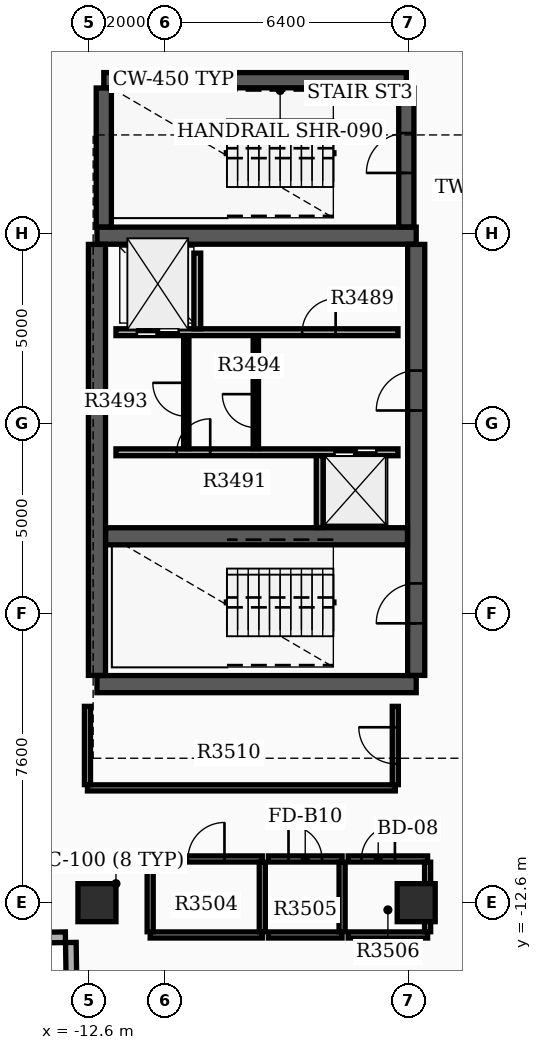
"""IFC4 building model, lengths in metres.
Left out: names, types, materials, properties, quantities, classifications, styles, units other than length and angle.
Written with IfcOpenShell. Run it as: python <this file> out.ifc"""

import sys

from ifc_helpers import new_model, si_unit, direction, frame, frame_2d, origin, origin_2d, place, context, subcontext, project, spatial, rectangle, extrude, element, fill, save


model = new_model("IFC4")
c1 = context("Model", 3, precision=1e-05, world=origin(), true_north=direction((0.0, 1.0)))
c2 = subcontext(c1, "Body", "Model", "MODEL_VIEW")
j1 = project(units=[si_unit("LENGTHUNIT", "METRE"), si_unit("PLANEANGLEUNIT", "RADIAN")], contexts=[c1])
p1 = place(None, origin())
s1 = spatial("IfcSite", under=j1, at=p1, CompositionType="ELEMENT")
p2 = place(p1, origin())
s2 = spatial("IfcBuilding", under=s1, at=p2, CompositionType="ELEMENT")
p3 = place(p2, frame((0.0, 0.0, 220.8)))
s3 = spatial("IfcBuildingStorey", under=s2, at=p3, CompositionType="ELEMENT", Elevation=220.8)
for number, where, z_axis, x_axis in (
    (1, (-12.4, -6.85, 0.0), (0.0, 0.0, 1.0), (1.0, 0.0, 0.0)),
    (2, (-12.4, 4.95, 0.0), (0.0, 0.0, 1.0), (1.0, 0.0, 0.0)),
):
    element("IfcWall", number, at=place(p3, frame(where, z_axis=z_axis, x_axis=x_axis)), inside=s3, PredefinedType="SHEAR", context=c2, shape_type="SweptSolid", body=[
        extrude(rectangle(XDim=8.4, YDim=0.45, at=frame_2d((4.2, 0.0))), origin(), (0.0, 0.0, 1.0), 3.7),
    ])
p4 = place(p3, frame((-12.4, -6.62, 0.0), z_axis=(0.0, 0.0, 1.0), x_axis=(0.0, 1.0, 0.0)))
e3 = element("IfcWall", 3, at=p4, inside=s3, PredefinedType="SHEAR", context=c2, shape_type="SweptSolid", body=[
    extrude(rectangle(XDim=11.34, YDim=0.45, at=frame_2d((5.67, 0.0))), origin(), (0.0, 0.0, 1.0), 3.7),
])
p5 = place(p3, frame((-4.0, -6.62, 0.0), z_axis=(0.0, 0.0, 1.0), x_axis=(0.0, 1.0, 0.0)))
e4 = element("IfcWall", 4, at=p5, inside=s3, PredefinedType="SHEAR", context=c2, shape_type="SweptSolid", body=[
    extrude(rectangle(XDim=11.34, YDim=0.45, at=frame_2d((5.67, 0.0))), origin(), (0.0, 0.0, 1.0), 3.7),
])
p6 = place(p5, frame((1.37, 0.0, 0.0)))
e5 = element("IfcOpeningElement", 5, at=p6, cuts=e4, PredefinedType="OPENING", context=c2, shape_type="SweptSolid", body=[
    extrude(rectangle(XDim=1.05, YDim=2.15, at=frame_2d((0.525, 1.075))), frame((0.0, 0.235, 0.0), z_axis=(0.0, -1.0, 0.0), x_axis=(1.0, 0.0, 0.0)), (0.0, 0.0, 1.0), 0.47),
])
p7 = place(p5, frame((6.97, 0.0, 0.0)))
e6 = element("IfcOpeningElement", 6, at=p7, cuts=e4, PredefinedType="OPENING", context=c2, shape_type="SweptSolid", body=[
    extrude(rectangle(XDim=1.05, YDim=2.15, at=frame_2d((0.525, 1.075))), frame((0.0, 0.235, 0.0), z_axis=(0.0, -1.0, 0.0), x_axis=(1.0, 0.0, 0.0)), (0.0, 0.0, 1.0), 0.47),
])
p8 = place(p3, frame((-12.17, -2.96, 0.0), z_axis=(0.0, 0.0, 1.0), x_axis=(1.0, 0.0, 0.0)))
e7 = element("IfcWall", 7, at=p8, inside=s3, PredefinedType="SHEAR", context=c2, shape_type="SweptSolid", body=[
    extrude(rectangle(XDim=7.94, YDim=0.45, at=frame_2d((3.97, 0.0))), origin(), (0.0, 0.0, 1.0), 3.7),
])
p9 = place(p3, frame((-12.22, 9.04, 0.0), z_axis=(0.0, 0.0, 1.0), x_axis=(1.0, 0.0, 0.0)))
e8 = element("IfcWall", 8, at=p9, inside=s3, PredefinedType="SHEAR", context=c2, shape_type="SweptSolid", body=[
    extrude(rectangle(XDim=7.96, YDim=0.4, at=frame_2d((3.98, 0.0))), origin(), (0.0, 0.0, 1.0), 3.7),
])
p10 = place(p3, frame((-12.22, 5.18, 0.0), z_axis=(0.0, 0.0, 1.0), x_axis=(0.0, 1.0, 0.0)))
e9 = element("IfcWall", 9, at=p10, inside=s3, PredefinedType="SHEAR", context=c2, shape_type="SweptSolid", body=[
    extrude(rectangle(XDim=3.655, YDim=0.4, at=frame_2d((1.828, 0.0))), origin(), (0.0, 0.0, 1.0), 3.7),
])
p11 = place(p3, frame((-4.26, 5.18, 0.0), z_axis=(0.0, 0.0, 1.0), x_axis=(0.0, 1.0, 0.0)))
e10 = element("IfcWall", 10, at=p11, inside=s3, PredefinedType="SHEAR", context=c2, shape_type="SweptSolid", body=[
    extrude(rectangle(XDim=3.655, YDim=0.4, at=frame_2d((1.828, 0.0))), origin(), (0.0, 0.0, 1.0), 3.7),
])
p12 = place(p11, frame((1.42, 0.0, 0.0)))
e11 = element("IfcOpeningElement", 11, at=p12, cuts=e10, PredefinedType="OPENING", context=c2, shape_type="SweptSolid", body=[
    extrude(rectangle(XDim=1.05, YDim=2.15, at=frame_2d((0.525, 1.075))), frame((0.0, 0.21, 0.0), z_axis=(0.0, -1.0, 0.0), x_axis=(1.0, 0.0, 0.0)), (0.0, 0.0, 1.0), 0.42),
])
for number, where, z_axis, x_axis in (
    (12, (-12.4, -12.6, 0.0), (0.0, 0.0, 1.0), (1.0, 0.0, 0.0)),
    (13, (-4.0, -12.6, 0.0), (0.0, 0.0, 1.0), (1.0, 0.0, 0.0)),
):
    element("IfcColumn", number, at=place(p3, frame(where, z_axis=z_axis, x_axis=x_axis)), inside=s3, PredefinedType="COLUMN", context=c2, shape_type="SweptSolid", body=[
        extrude(rectangle(XDim=1.0, YDim=1.0, at=origin_2d()), origin(), (0.0, 0.0, 1.0), 3.9),
    ])
p13 = place(p3, frame((-14.449, -13.529, 0.0), z_axis=(0.0, 0.0, 1.0), x_axis=(0.999878147354, 0.015610587569, 0.0)))
e14 = element("IfcWall", 14, at=p13, inside=s3, PredefinedType="STANDARD", context=c2, shape_type="SweptSolid", body=[
    extrude(rectangle(XDim=1.22, YDim=0.28, at=frame_2d((0.61, 0.0))), origin(), (0.0, 0.0, 1.0), 3.18),
])
p14 = place(p3, frame((-13.087, -13.647, 0.0), z_axis=(0.0, 0.0, 1.0), x_axis=(0.015785793208, -0.999875396603, 0.0)))
e15 = element("IfcWall", 15, at=p14, inside=s3, PredefinedType="STANDARD", context=c2, shape_type="SweptSolid", body=[
    extrude(rectangle(XDim=1.5, YDim=0.28, at=frame_2d((0.75, 0.0))), origin(), (0.0, 0.0, 1.0), 3.18),
])
p15 = place(p3, frame((-11.9, 2.41, 0.0), z_axis=(0.0, 0.0, 1.0), x_axis=(1.0, 0.0, 0.0)))
e16 = element("IfcWall", 16, at=p15, inside=s3, PredefinedType="SOLIDWALL", context=c2, shape_type="SweptSolid", body=[
    extrude(rectangle(XDim=7.42, YDim=0.18, at=frame_2d((3.71, 0.0))), origin(), (0.0, 0.0, 1.0), 3.17),
])
p16 = place(p15, frame((0.55, 0.0, 0.0)))
e17 = element("IfcOpeningElement", 17, at=p16, cuts=e16, PredefinedType="OPENING", context=c2, shape_type="SweptSolid", body=[
    extrude(rectangle(XDim=1.1, YDim=2.15, at=frame_2d((0.55, 1.075))), frame((0.0, 0.1, 0.0), z_axis=(0.0, -1.0, 0.0), x_axis=(1.0, 0.0, 0.0)), (0.0, 0.0, 1.0), 0.2),
])
p17 = place(p15, frame((4.9, 0.0, 0.0)))
e18 = element("IfcOpeningElement", 18, at=p17, cuts=e16, PredefinedType="OPENING", context=c2, shape_type="SweptSolid", body=[
    extrude(rectangle(XDim=0.88, YDim=2.1, at=frame_2d((0.44, 1.05))), frame((0.0, 0.1, 0.0), z_axis=(0.0, -1.0, 0.0), x_axis=(1.0, 0.0, 0.0)), (0.0, 0.0, 1.0), 0.2),
])
p18 = place(p3, frame((-11.9, -0.75, 0.0), z_axis=(0.0, 0.0, 1.0), x_axis=(1.0, 0.0, 0.0)))
e19 = element("IfcWall", 19, at=p18, inside=s3, PredefinedType="SOLIDWALL", context=c2, shape_type="SweptSolid", body=[
    extrude(rectangle(XDim=7.42, YDim=0.18, at=frame_2d((3.71, 0.0))), origin(), (0.0, 0.0, 1.0), 3.17),
])
p19 = place(p18, frame((5.75, 0.0, 0.0)))
e20 = element("IfcOpeningElement", 20, at=p19, cuts=e19, PredefinedType="OPENING", context=c2, shape_type="SweptSolid", body=[
    extrude(rectangle(XDim=1.1, YDim=2.15, at=frame_2d((0.55, 1.075))), frame((0.0, 0.1, 0.0), z_axis=(0.0, -1.0, 0.0), x_axis=(1.0, 0.0, 0.0)), (0.0, 0.0, 1.0), 0.2),
])
p20 = place(p18, frame((1.6, 0.0, 0.0)))
e21 = element("IfcOpeningElement", 21, at=p20, cuts=e19, PredefinedType="OPENING", context=c2, shape_type="SweptSolid", body=[
    extrude(rectangle(XDim=0.88, YDim=2.1, at=frame_2d((0.44, 1.05))), frame((0.0, 0.1, 0.0), z_axis=(0.0, -1.0, 0.0), x_axis=(1.0, 0.0, 0.0)), (0.0, 0.0, 1.0), 0.2),
])
p21 = place(p3, frame((-9.76, 2.5, 0.0), z_axis=(0.0, 0.0, 1.0), x_axis=(0.0, 1.0, 0.0)))
e22 = element("IfcWall", 22, at=p21, inside=s3, PredefinedType="SOLIDWALL", context=c2, shape_type="SweptSolid", body=[
    extrude(rectangle(XDim=1.99, YDim=0.18, at=frame_2d((0.995, 0.0))), origin(), (0.0, 0.0, 1.0), 3.17),
])
p22 = place(p3, frame((-6.54, -2.73, 0.0), z_axis=(0.0, 0.0, 1.0), x_axis=(0.0, 1.0, 0.0)))
e23 = element("IfcWall", 23, at=p22, inside=s3, PredefinedType="SOLIDWALL", context=c2, shape_type="SweptSolid", body=[
    extrude(rectangle(XDim=1.89, YDim=0.18, at=frame_2d((0.945, 0.0))), origin(), (0.0, 0.0, 1.0), 3.17),
])
p23 = place(p3, frame((-8.22, -0.65, 0.0), z_axis=(0.0, 0.0, 1.0), x_axis=(0.0, 1.0, 0.0)))
e24 = element("IfcWall", 24, at=p23, inside=s3, PredefinedType="SOLIDWALL", context=c2, shape_type="SweptSolid", body=[
    extrude(rectangle(XDim=2.96, YDim=0.14, at=frame_2d((1.48, 0.0))), origin(), (0.0, 0.0, 1.0), 3.17),
])
p24 = place(p23, frame((0.55, 0.0, 0.0)))
e25 = element("IfcOpeningElement", 25, at=p24, cuts=e24, PredefinedType="OPENING", context=c2, shape_type="SweptSolid", body=[
    extrude(rectangle(XDim=0.88, YDim=2.1, at=frame_2d((0.44, 1.05))), frame((0.0, 0.08, 0.0), z_axis=(0.0, -1.0, 0.0), x_axis=(1.0, 0.0, 0.0)), (0.0, 0.0, 1.0), 0.16),
])
p25 = place(p3, frame((-10.05, -0.652, 0.0), z_axis=(0.0, 0.0, 1.0), x_axis=(0.0, 1.0, 0.0)))
e26 = element("IfcWall", 26, at=p25, inside=s3, PredefinedType="PARTITIONING", context=c2, shape_type="SweptSolid", body=[
    extrude(rectangle(XDim=2.962, YDim=0.14, at=frame_2d((1.481, 0.0))), origin(), (0.0, 0.0, 1.0), 3.17),
])
p26 = place(p25, frame((0.85, 0.0, 0.0)))
e27 = element("IfcOpeningElement", 27, at=p26, cuts=e26, PredefinedType="OPENING", context=c2, shape_type="SweptSolid", body=[
    extrude(rectangle(XDim=0.88, YDim=2.1, at=frame_2d((0.44, 1.05))), frame((0.0, 0.08, 0.0), z_axis=(0.0, -1.0, 0.0), x_axis=(1.0, 0.0, 0.0)), (0.0, 0.0, 1.0), 0.16),
])
p27 = place(p3, frame((-11.0, -13.45, 0.0), z_axis=(0.0, 0.0, 1.0), x_axis=(1.0, 0.0, 0.0)))
e28 = element("IfcWall", 28, at=p27, inside=s3, PredefinedType="PARTITIONING", context=c2, shape_type="SweptSolid", body=[
    extrude(rectangle(XDim=2.95, YDim=0.16, at=frame_2d((1.475, 0.0))), origin(), (0.0, 0.0, 1.0), 3.17),
])
p28 = place(p3, frame((-11.0, -11.45, 0.0), z_axis=(0.0, 0.0, 1.0), x_axis=(1.0, 0.0, 0.0)))
e29 = element("IfcWall", 29, at=p28, inside=s3, PredefinedType="PARTITIONING", context=c2, shape_type="SweptSolid", body=[
    extrude(rectangle(XDim=2.95, YDim=0.16, at=frame_2d((1.475, 0.0))), origin(), (0.0, 0.0, 1.0), 3.17),
])
p29 = place(p28, frame((0.995, 0.0, 0.0)))
e30 = element("IfcOpeningElement", 30, at=p29, cuts=e29, PredefinedType="OPENING", context=c2, shape_type="SweptSolid", body=[
    extrude(rectangle(XDim=0.96, YDim=2.15, at=frame_2d((0.48, 1.075))), frame((0.0, 0.09, 0.0), z_axis=(0.0, -1.0, 0.0), x_axis=(1.0, 0.0, 0.0)), (0.0, 0.0, 1.0), 0.18),
])
for number, where, z_axis, x_axis in (
    (31, (-11.0, -13.365, 0.0), (0.0, 0.0, 1.0), (0.0, 1.0, 0.0)),
    (32, (-8.05, -13.365, 0.0), (0.0, 0.0, 1.0), (0.0, 1.0, 0.0)),
):
    element("IfcWall", number, at=place(p3, frame(where, z_axis=z_axis, x_axis=x_axis)), inside=s3, PredefinedType="PARTITIONING", context=c2, shape_type="SweptSolid", body=[
        extrude(rectangle(XDim=1.83, YDim=0.16, at=frame_2d((0.915, 0.0))), origin(), (0.0, 0.0, 1.0), 3.17),
    ])
p30 = place(p3, frame((-7.89, -13.45, 0.0), z_axis=(0.0, 0.0, 1.0), x_axis=(1.0, 0.0, 0.0)))
e33 = element("IfcWall", 33, at=p30, inside=s3, PredefinedType="PARTITIONING", context=c2, shape_type="SweptSolid", body=[
    extrude(rectangle(XDim=1.94, YDim=0.16, at=frame_2d((0.97, 0.0))), origin(), (0.0, 0.0, 1.0), 3.17),
])
p31 = place(p3, frame((-7.89, -11.45, 0.0), z_axis=(0.0, 0.0, 1.0), x_axis=(1.0, 0.0, 0.0)))
e34 = element("IfcWall", 34, at=p31, inside=s3, PredefinedType="PARTITIONING", context=c2, shape_type="SweptSolid", body=[
    extrude(rectangle(XDim=1.94, YDim=0.16, at=frame_2d((0.97, 0.0))), origin(), (0.0, 0.0, 1.0), 3.17),
])
p32 = place(p31, frame((0.53, 0.0, 0.0)))
e35 = element("IfcOpeningElement", 35, at=p32, cuts=e34, PredefinedType="OPENING", context=c2, shape_type="SweptSolid", body=[
    extrude(rectangle(XDim=0.88, YDim=2.1, at=frame_2d((0.44, 1.05))), frame((0.0, 0.09, 0.0), z_axis=(0.0, -1.0, 0.0), x_axis=(1.0, 0.0, 0.0)), (0.0, 0.0, 1.0), 0.18),
])
p33 = place(p3, frame((-5.95, -13.365, 0.0), z_axis=(0.0, 0.0, 1.0), x_axis=(0.0, 1.0, 0.0)))
e36 = element("IfcWall", 36, at=p33, inside=s3, PredefinedType="PARTITIONING", context=c2, shape_type="SweptSolid", body=[
    extrude(rectangle(XDim=1.83, YDim=0.16, at=frame_2d((0.915, 0.0))), origin(), (0.0, 0.0, 1.0), 3.17),
])
p34 = place(p3, frame((-5.79, -13.45, 0.0), z_axis=(0.0, 0.0, 1.0), x_axis=(1.0, 0.0, 0.0)))
e37 = element("IfcWall", 37, at=p34, inside=s3, PredefinedType="PARTITIONING", context=c2, shape_type="SweptSolid", body=[
    extrude(rectangle(XDim=2.09, YDim=0.16, at=frame_2d((1.045, 0.0))), origin(), (0.0, 0.0, 1.0), 3.17),
])
p35 = place(p3, frame((-5.79, -11.45, 0.0), z_axis=(0.0, 0.0, 1.0), x_axis=(1.0, 0.0, 0.0)))
e38 = element("IfcWall", 38, at=p35, inside=s3, PredefinedType="PARTITIONING", context=c2, shape_type="SweptSolid", body=[
    extrude(rectangle(XDim=2.09, YDim=0.16, at=frame_2d((1.045, 0.0))), origin(), (0.0, 0.0, 1.0), 3.17),
])
p36 = place(p35, frame((0.35, 0.0, 0.0)))
e39 = element("IfcOpeningElement", 39, at=p36, cuts=e38, PredefinedType="OPENING", context=c2, shape_type="SweptSolid", body=[
    extrude(rectangle(XDim=0.88, YDim=2.15, at=frame_2d((0.44, 1.075))), frame((0.0, 0.09, 0.0), z_axis=(0.0, -1.0, 0.0), x_axis=(1.0, 0.0, 0.0)), (0.0, 0.0, 1.0), 0.18),
])
p37 = place(p3, frame((-3.7, -13.365, 0.0), z_axis=(0.0, 0.0, 1.0), x_axis=(0.0, 1.0, 0.0)))
e40 = element("IfcWall", 40, at=p37, inside=s3, PredefinedType="PARTITIONING", context=c2, shape_type="SweptSolid", body=[
    extrude(rectangle(XDim=1.83, YDim=0.16, at=frame_2d((0.915, 0.0))), origin(), (0.0, 0.0, 1.0), 3.17),
])
p38 = place(p3, frame((-12.65, -9.58, 0.0), z_axis=(0.0, 0.0, 1.0), x_axis=(1.0, 0.0, 0.0)))
e41 = element("IfcWall", 41, at=p38, inside=s3, PredefinedType="PARTITIONING", context=c2, shape_type="SweptSolid", body=[
    extrude(rectangle(XDim=8.1, YDim=0.16, at=frame_2d((4.05, 0.0))), origin(), (0.0, 0.0, 1.0), 3.17),
])
p39 = place(p3, frame((-12.65, -9.495, 0.0), z_axis=(0.0, 0.0, 1.0), x_axis=(0.0, 1.0, 0.0)))
e42 = element("IfcWall", 42, at=p39, inside=s3, PredefinedType="PARTITIONING", context=c2, shape_type="SweptSolid", body=[
    extrude(rectangle(XDim=2.06, YDim=0.16, at=frame_2d((1.03, 0.0))), origin(), (0.0, 0.0, 1.0), 3.17),
])
p40 = place(p3, frame((-4.55, -9.495, 0.0), z_axis=(0.0, 0.0, 1.0), x_axis=(0.0, 1.0, 0.0)))
e43 = element("IfcWall", 43, at=p40, inside=s3, PredefinedType="PARTITIONING", context=c2, shape_type="SweptSolid", body=[
    extrude(rectangle(XDim=2.06, YDim=0.16, at=frame_2d((1.03, 0.0))), origin(), (0.0, 0.0, 1.0), 3.17),
])
p41 = place(p40, frame((0.55, 0.0, 0.0)))
e44 = element("IfcOpeningElement", 44, at=p41, cuts=e43, PredefinedType="OPENING", context=c2, shape_type="SweptSolid", body=[
    extrude(rectangle(XDim=0.96, YDim=2.15, at=frame_2d((0.48, 1.075))), frame((0.0, 0.09, 0.0), z_axis=(0.0, -1.0, 0.0), x_axis=(1.0, 0.0, 0.0)), (0.0, 0.0, 1.0), 0.18),
])
p42 = place(p6, origin())
e45 = element("IfcDoor", 45, at=p42, inside=s3, OperationType="SINGLE_SWING_LEFT", PredefinedType="DOOR", context=c2, shape_type="SweptSolid", body=[
    extrude(rectangle(XDim=1.05, YDim=2.15, at=frame_2d((0.525, 1.075))), frame((0.0, 0.025, 0.0), z_axis=(0.0, -1.0, 0.0), x_axis=(1.0, 0.0, 0.0)), (0.0, 0.0, 1.0), 0.05),
])
fill(e5, e45)
p43 = place(p7, origin())
e46 = element("IfcDoor", 46, at=p43, inside=s3, OperationType="SINGLE_SWING_LEFT", PredefinedType="DOOR", context=c2, shape_type="SweptSolid", body=[
    extrude(rectangle(XDim=1.05, YDim=2.15, at=frame_2d((0.525, 1.075))), frame((0.0, 0.025, 0.0), z_axis=(0.0, -1.0, 0.0), x_axis=(1.0, 0.0, 0.0)), (0.0, 0.0, 1.0), 0.05),
])
fill(e6, e46)
p44 = place(p12, origin())
e47 = element("IfcDoor", 47, at=p44, inside=s3, OperationType="SINGLE_SWING_LEFT", PredefinedType="DOOR", context=c2, shape_type="SweptSolid", body=[
    extrude(rectangle(XDim=1.05, YDim=2.15, at=frame_2d((0.525, 1.075))), frame((0.0, 0.025, 0.0), z_axis=(0.0, -1.0, 0.0), x_axis=(1.0, 0.0, 0.0)), (0.0, 0.0, 1.0), 0.05),
])
fill(e11, e47)
p45 = place(p16, origin())
e48 = element("IfcDoor", 48, at=p45, inside=s3, OperationType="DOUBLE_DOOR_SLIDING", PredefinedType="DOOR", context=c2, shape_type="SweptSolid", body=[
    extrude(rectangle(XDim=1.1, YDim=2.15, at=frame_2d((0.55, 1.075))), frame((0.0, 0.025, 0.0), z_axis=(0.0, -1.0, 0.0), x_axis=(1.0, 0.0, 0.0)), (0.0, 0.0, 1.0), 0.05),
])
fill(e17, e48)
p46 = place(p19, origin())
e49 = element("IfcDoor", 49, at=p46, inside=s3, OperationType="DOUBLE_DOOR_SLIDING", PredefinedType="DOOR", context=c2, shape_type="SweptSolid", body=[
    extrude(rectangle(XDim=1.1, YDim=2.15, at=frame_2d((0.55, 1.075))), frame((0.0, 0.025, 0.0), z_axis=(0.0, -1.0, 0.0), x_axis=(1.0, 0.0, 0.0)), (0.0, 0.0, 1.0), 0.05),
])
fill(e20, e49)
p47 = place(p17, origin())
e50 = element("IfcDoor", 50, at=p47, inside=s3, OperationType="SINGLE_SWING_RIGHT", PredefinedType="DOOR", context=c2, shape_type="SweptSolid", body=[
    extrude(rectangle(XDim=0.88, YDim=2.1, at=frame_2d((0.44, 1.05))), frame((0.0, 0.025, 0.0), z_axis=(0.0, -1.0, 0.0), x_axis=(1.0, 0.0, 0.0)), (0.0, 0.0, 1.0), 0.05),
])
fill(e18, e50)
p48 = place(p20, origin())
e51 = element("IfcDoor", 51, at=p48, inside=s3, OperationType="SINGLE_SWING_RIGHT", PredefinedType="DOOR", context=c2, shape_type="SweptSolid", body=[
    extrude(rectangle(XDim=0.88, YDim=2.1, at=frame_2d((0.44, 1.05))), frame((0.0, 0.025, 0.0), z_axis=(0.0, -1.0, 0.0), x_axis=(1.0, 0.0, 0.0)), (0.0, 0.0, 1.0), 0.05),
])
fill(e21, e51)
p49 = place(p24, origin())
e52 = element("IfcDoor", 52, at=p49, inside=s3, OperationType="SINGLE_SWING_RIGHT", PredefinedType="DOOR", context=c2, shape_type="SweptSolid", body=[
    extrude(rectangle(XDim=0.88, YDim=2.1, at=frame_2d((0.44, 1.05))), frame((0.0, 0.025, 0.0), z_axis=(0.0, -1.0, 0.0), x_axis=(1.0, 0.0, 0.0)), (0.0, 0.0, 1.0), 0.05),
])
fill(e25, e52)
p50 = place(p26, origin())
e53 = element("IfcDoor", 53, at=p50, inside=s3, OperationType="SINGLE_SWING_RIGHT", PredefinedType="DOOR", context=c2, shape_type="SweptSolid", body=[
    extrude(rectangle(XDim=0.88, YDim=2.1, at=frame_2d((0.44, 1.05))), frame((0.0, 0.025, 0.0), z_axis=(0.0, -1.0, 0.0), x_axis=(1.0, 0.0, 0.0)), (0.0, 0.0, 1.0), 0.05),
])
fill(e27, e53)
p51 = place(p29, origin())
e54 = element("IfcDoor", 54, at=p51, inside=s3, OperationType="SINGLE_SWING_RIGHT", PredefinedType="DOOR", context=c2, shape_type="SweptSolid", body=[
    extrude(rectangle(XDim=0.96, YDim=2.15, at=frame_2d((0.48, 1.075))), frame((0.0, 0.025, 0.0), z_axis=(0.0, -1.0, 0.0), x_axis=(1.0, 0.0, 0.0)), (0.0, 0.0, 1.0), 0.05),
])
fill(e30, e54)
p52 = place(p32, origin())
e55 = element("IfcDoor", 55, at=p52, inside=s3, OperationType="SINGLE_SWING_LEFT", PredefinedType="DOOR", context=c2, shape_type="SweptSolid", body=[
    extrude(rectangle(XDim=0.88, YDim=2.1, at=frame_2d((0.44, 1.05))), frame((0.0, 0.025, 0.0), z_axis=(0.0, -1.0, 0.0), x_axis=(1.0, 0.0, 0.0)), (0.0, 0.0, 1.0), 0.05),
])
fill(e35, e55)
p53 = place(p36, origin())
e56 = element("IfcDoor", 56, at=p53, inside=s3, OperationType="SINGLE_SWING_RIGHT", PredefinedType="DOOR", context=c2, shape_type="SweptSolid", body=[
    extrude(rectangle(XDim=0.88, YDim=2.15, at=frame_2d((0.44, 1.075))), frame((0.0, 0.025, 0.0), z_axis=(0.0, -1.0, 0.0), x_axis=(1.0, 0.0, 0.0)), (0.0, 0.0, 1.0), 0.05),
])
fill(e39, e56)
p54 = place(p41, origin())
e57 = element("IfcDoor", 57, at=p54, inside=s3, OperationType="SINGLE_SWING_RIGHT", PredefinedType="DOOR", context=c2, shape_type="SweptSolid", body=[
    extrude(rectangle(XDim=0.96, YDim=2.15, at=frame_2d((0.48, 1.075))), frame((0.0, 0.025, 0.0), z_axis=(0.0, -1.0, 0.0), x_axis=(1.0, 0.0, 0.0)), (0.0, 0.0, 1.0), 0.05),
])
fill(e44, e57)
save(model, sys.argv[1])
